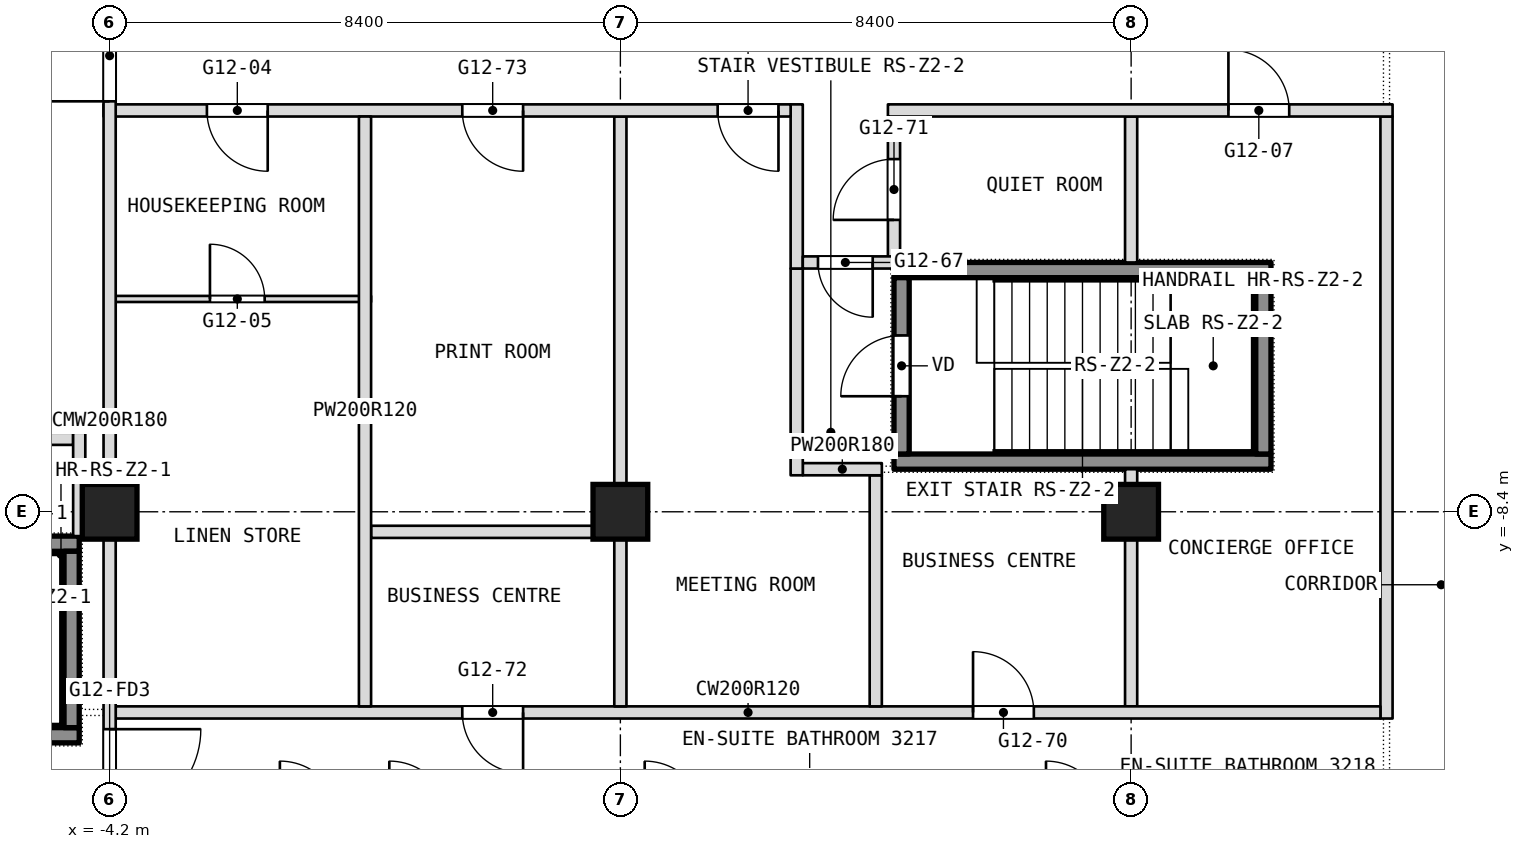
"""IFC4 building model, lengths in metres.
Left out: names, types, materials, properties, quantities, classifications, styles, units other than length and angle.
Written with IfcOpenShell. Run it as: python <this file> out.ifc"""

import sys

from ifc_helpers import new_model, si_unit, direction, frame, frame_2d, origin, origin_2d, place, context, subcontext, project, spatial, rectangle, extrude, element, fill, save


model = new_model("IFC4")
c1 = context("Model", 3, precision=1e-05, world=origin(), true_north=direction((0.0, 1.0)))
c2 = subcontext(c1, "Body", "Model", "MODEL_VIEW")
j1 = project(units=[si_unit("LENGTHUNIT", "METRE"), si_unit("PLANEANGLEUNIT", "RADIAN")], contexts=[c1])
p1 = place(None, origin())
s1 = spatial("IfcSite", under=j1, at=p1, CompositionType="ELEMENT")
p2 = place(p1, origin())
s2 = spatial("IfcBuilding", under=s1, at=p2, CompositionType="ELEMENT")
p3 = place(p2, frame((0.0, 0.0, 140.9)))
s3 = spatial("IfcBuildingStorey", under=s2, at=p3, CompositionType="ELEMENT", Elevation=140.9)
for number, where, z_axis, x_axis in (
    (1, (-4.2, -8.4, 0.0), (0.0, 0.0, 1.0), (1.0, 0.0, 0.0)),
    (2, (4.2, -8.4, 0.0), (0.0, 0.0, 1.0), (1.0, 0.0, 0.0)),
    (3, (12.6, -8.4, 0.0), (0.0, 0.0, 1.0), (1.0, 0.0, 0.0)),
):
    element("IfcColumn", number, at=place(p3, frame(where, z_axis=z_axis, x_axis=x_axis)), inside=s3, PredefinedType="COLUMN", context=c2, shape_type="SweptSolid", body=[
        extrude(rectangle(XDim=0.9, YDim=0.9, at=origin_2d()), origin(), (0.0, 0.0, 1.0), 3.6),
    ])
p4 = place(p3, frame((16.8, -11.8, 0.0), z_axis=(0.0, 0.0, 1.0), x_axis=(0.0, 1.0, 0.0)))
e4 = element("IfcWall", 4, at=p4, inside=s3, PredefinedType="PARTITIONING", context=c2, shape_type="SweptSolid", body=[
    extrude(rectangle(XDim=9.9, YDim=0.2, at=frame_2d((4.95, 0.0))), origin(), (0.0, 0.0, 1.0), 3.34),
])
p5 = place(p3, frame((12.6, -11.6, 0.0), z_axis=(0.0, 0.0, 1.0), x_axis=(0.0, 1.0, 0.0)))
e5 = element("IfcWall", 5, at=p5, inside=s3, PredefinedType="PARTITIONING", context=c2, shape_type="SweptSolid", body=[
    extrude(rectangle(XDim=3.9, YDim=0.2, at=frame_2d((1.95, 0.0))), origin(), (0.0, 0.0, 1.0), 3.34),
])
p6 = place(p3, frame((12.6, -4.3, 0.0), z_axis=(0.0, 0.0, 1.0), x_axis=(0.0, 1.0, 0.0)))
e6 = element("IfcWall", 6, at=p6, inside=s3, PredefinedType="PARTITIONING", context=c2, shape_type="SweptSolid", body=[
    extrude(rectangle(XDim=2.4, YDim=0.2, at=frame_2d((1.2, 0.0))), origin(), (0.0, 0.0, 1.0), 3.34),
])
p7 = place(p3, frame((-4.1, -11.7, 0.0), z_axis=(0.0, 0.0, 1.0), x_axis=(1.0, 0.0, 0.0)))
e7 = element("IfcWall", 7, at=p7, inside=s3, PredefinedType="PARTITIONING", context=c2, shape_type="SweptSolid", body=[
    extrude(rectangle(XDim=20.8, YDim=0.2, at=frame_2d((10.4, 0.0))), origin(), (0.0, 0.0, 1.0), 3.34),
])
p8 = place(p7, frame((14.1, 0.0, 0.0)))
e8 = element("IfcOpeningElement", 8, at=p8, cuts=e7, PredefinedType="OPENING", context=c2, shape_type="SweptSolid", body=[
    extrude(rectangle(XDim=1.0, YDim=2.1, at=frame_2d((0.5, 1.05))), frame((0.0, 0.1, 0.0), z_axis=(0.0, -1.0, 0.0), x_axis=(1.0, 0.0, 0.0)), (0.0, 0.0, 1.0), 0.2),
])
p9 = place(p7, frame((5.7, 0.0, 0.0)))
e9 = element("IfcOpeningElement", 9, at=p9, cuts=e7, PredefinedType="OPENING", context=c2, shape_type="SweptSolid", body=[
    extrude(rectangle(XDim=1.0, YDim=2.1, at=frame_2d((0.5, 1.05))), frame((0.0, 0.1, 0.0), z_axis=(0.0, -1.0, 0.0), x_axis=(1.0, 0.0, 0.0)), (0.0, 0.0, 1.0), 0.2),
])
p10 = place(p3, frame((0.1, -8.73, 0.0), z_axis=(0.0, 0.0, 1.0), x_axis=(1.0, 0.0, 0.0)))
e10 = element("IfcWall", 10, at=p10, inside=s3, PredefinedType="PARTITIONING", context=c2, shape_type="SweptSolid", body=[
    extrude(rectangle(XDim=4.0, YDim=0.2, at=frame_2d((2.0, 0.0))), origin(), (0.0, 0.0, 1.0), 3.34),
])
p11 = place(p3, frame((8.7, -4.3, 0.0), z_axis=(0.0, 0.0, 1.0), x_axis=(0.0, 1.0, 0.0)))
e11 = element("IfcWall", 11, at=p11, inside=s3, PredefinedType="PARTITIONING", context=c2, shape_type="SweptSolid", body=[
    extrude(rectangle(XDim=2.4, YDim=0.2, at=frame_2d((1.2, 0.0))), origin(), (0.0, 0.0, 1.0), 3.34),
])
p12 = place(p11, frame((0.7, 0.0, 0.0)))
e12 = element("IfcOpeningElement", 12, at=p12, cuts=e11, PredefinedType="OPENING", context=c2, shape_type="SweptSolid", body=[
    extrude(rectangle(XDim=1.0, YDim=2.1, at=frame_2d((0.5, 1.05))), frame((0.0, 0.1, 0.0), z_axis=(0.0, -1.0, 0.0), x_axis=(1.0, 0.0, 0.0)), (0.0, 0.0, 1.0), 0.2),
])
p13 = place(p3, frame((8.4, -11.6, 0.0), z_axis=(0.0, 0.0, 1.0), x_axis=(0.0, 1.0, 0.0)))
e13 = element("IfcWall", 13, at=p13, inside=s3, PredefinedType="PARTITIONING", context=c2, shape_type="SweptSolid", body=[
    extrude(rectangle(XDim=3.8, YDim=0.2, at=frame_2d((1.9, 0.0))), origin(), (0.0, 0.0, 1.0), 3.34),
])
p14 = place(p3, frame((7.2, -7.7, 0.0), z_axis=(0.0, 0.0, 1.0), x_axis=(1.0, 0.0, 0.0)))
e14 = element("IfcWall", 14, at=p14, inside=s3, PredefinedType="PARTITIONING", context=c2, shape_type="SweptSolid", body=[
    extrude(rectangle(XDim=1.3, YDim=0.2, at=frame_2d((0.65, 0.0))), origin(), (0.0, 0.0, 1.0), 3.34),
])
p15 = place(p3, frame((-8.5, -7.2, 0.0), z_axis=(0.0, 0.0, 1.0), x_axis=(1.0, 0.0, 0.0)))
e15 = element("IfcWall", 15, at=p15, inside=s3, PredefinedType="PARTITIONING", context=c2, shape_type="SweptSolid", body=[
    extrude(rectangle(XDim=3.7, YDim=0.2, at=frame_2d((1.85, 0.0))), origin(), (0.0, 0.0, 1.0), 3.34),
])
p16 = place(p15, frame((0.25, 0.0, 0.0)))
e16 = element("IfcOpeningElement", 16, at=p16, cuts=e15, PredefinedType="OPENING", context=c2, shape_type="SweptSolid", body=[
    extrude(rectangle(XDim=0.9, YDim=2.1, at=frame_2d((0.45, 1.05))), frame((0.0, 0.1, 0.0), z_axis=(0.0, -1.0, 0.0), x_axis=(1.0, 0.0, 0.0)), (0.0, 0.0, 1.0), 0.2),
])
p17 = place(p3, frame((7.1, -7.8, 0.0), z_axis=(0.0, 0.0, 1.0), x_axis=(0.0, 1.0, 0.0)))
e17 = element("IfcWall", 17, at=p17, inside=s3, PredefinedType="PARTITIONING", context=c2, shape_type="SweptSolid", body=[
    extrude(rectangle(XDim=3.4, YDim=0.2, at=frame_2d((1.7, 0.0))), origin(), (0.0, 0.0, 1.0), 3.34),
])
p18 = place(p3, frame((7.1, -4.4, 0.0), z_axis=(0.0, 0.0, 1.0), x_axis=(0.0, 1.0, 0.0)))
e18 = element("IfcWall", 18, at=p18, inside=s3, PredefinedType="PARTITIONING", context=c2, shape_type="SweptSolid", body=[
    extrude(rectangle(XDim=2.7, YDim=0.2, at=frame_2d((1.35, 0.0))), origin(), (0.0, 0.0, 1.0), 3.34),
])
p19 = place(p3, frame((-4.1, -4.9, 0.0), z_axis=(0.0, 0.0, 1.0), x_axis=(1.0, 0.0, 0.0)))
e19 = element("IfcWall", 19, at=p19, inside=s3, PredefinedType="PARTITIONING", context=c2, shape_type="SweptSolid", body=[
    extrude(rectangle(XDim=4.2, YDim=0.1, at=frame_2d((2.1, 0.0))), origin(), (0.0, 0.0, 1.0), 3.34),
])
p20 = place(p19, frame((1.55, 0.0, 0.0)))
e20 = element("IfcOpeningElement", 20, at=p20, cuts=e19, PredefinedType="OPENING", context=c2, shape_type="SweptSolid", body=[
    extrude(rectangle(XDim=0.9, YDim=2.1, at=frame_2d((0.45, 1.05))), frame((0.0, 0.05, 0.0), z_axis=(0.0, -1.0, 0.0), x_axis=(1.0, 0.0, 0.0)), (0.0, 0.0, 1.0), 0.1),
])
p21 = place(p3, frame((7.2, -4.3, 0.0), z_axis=(0.0, 0.0, 1.0), x_axis=(1.0, 0.0, 0.0)))
e21 = element("IfcWall", 21, at=p21, inside=s3, PredefinedType="PARTITIONING", context=c2, shape_type="SweptSolid", body=[
    extrude(rectangle(XDim=1.5, YDim=0.2, at=frame_2d((0.75, 0.0))), origin(), (0.0, 0.0, 1.0), 3.34),
])
p22 = place(p21, frame((0.25, 0.0, 0.0)))
e22 = element("IfcOpeningElement", 22, at=p22, cuts=e21, PredefinedType="OPENING", context=c2, shape_type="SweptSolid", body=[
    extrude(rectangle(XDim=0.9, YDim=2.1, at=frame_2d((0.45, 1.05))), frame((0.0, 0.1, 0.0), z_axis=(0.0, -1.0, 0.0), x_axis=(1.0, 0.0, 0.0)), (0.0, 0.0, 1.0), 0.2),
])
p23 = place(p3, frame((4.2, -11.6, 0.0), z_axis=(0.0, 0.0, 1.0), x_axis=(0.0, 1.0, 0.0)))
e23 = element("IfcWall", 23, at=p23, inside=s3, PredefinedType="PARTITIONING", context=c2, shape_type="SweptSolid", body=[
    extrude(rectangle(XDim=9.7, YDim=0.2, at=frame_2d((4.85, 0.0))), origin(), (0.0, 0.0, 1.0), 3.34),
])
p24 = place(p3, frame((-4.3, -1.8, 0.0), z_axis=(0.0, 0.0, 1.0), x_axis=(1.0, 0.0, 0.0)))
e24 = element("IfcWall", 24, at=p24, inside=s3, PredefinedType="PARTITIONING", context=c2, shape_type="SweptSolid", body=[
    extrude(rectangle(XDim=11.3, YDim=0.2, at=frame_2d((5.65, 0.0))), origin(), (0.0, 0.0, 1.0), 3.34),
])
p25 = place(p24, frame((1.7, 0.0, 0.0)))
e25 = element("IfcOpeningElement", 25, at=p25, cuts=e24, PredefinedType="OPENING", context=c2, shape_type="SweptSolid", body=[
    extrude(rectangle(XDim=1.0, YDim=2.1, at=frame_2d((0.5, 1.05))), frame((0.0, 0.1, 0.0), z_axis=(0.0, -1.0, 0.0), x_axis=(1.0, 0.0, 0.0)), (0.0, 0.0, 1.0), 0.2),
])
p26 = place(p24, frame((10.1, 0.0, 0.0)))
e26 = element("IfcOpeningElement", 26, at=p26, cuts=e24, PredefinedType="OPENING", context=c2, shape_type="SweptSolid", body=[
    extrude(rectangle(XDim=1.0, YDim=2.1, at=frame_2d((0.5, 1.05))), frame((0.0, 0.1, 0.0), z_axis=(0.0, -1.0, 0.0), x_axis=(1.0, 0.0, 0.0)), (0.0, 0.0, 1.0), 0.2),
])
p27 = place(p24, frame((5.9, 0.0, 0.0)))
e27 = element("IfcOpeningElement", 27, at=p27, cuts=e24, PredefinedType="OPENING", context=c2, shape_type="SweptSolid", body=[
    extrude(rectangle(XDim=1.0, YDim=2.1, at=frame_2d((0.5, 1.05))), frame((0.0, 0.1, 0.0), z_axis=(0.0, -1.0, 0.0), x_axis=(1.0, 0.0, 0.0)), (0.0, 0.0, 1.0), 0.2),
])
p28 = place(p3, frame((8.6, -1.8, 0.0), z_axis=(0.0, 0.0, 1.0), x_axis=(1.0, 0.0, 0.0)))
e28 = element("IfcWall", 28, at=p28, inside=s3, PredefinedType="PARTITIONING", context=c2, shape_type="SweptSolid", body=[
    extrude(rectangle(XDim=8.3, YDim=0.2, at=frame_2d((4.15, 0.0))), origin(), (0.0, 0.0, 1.0), 3.34),
])
p29 = place(p28, frame((5.6, 0.0, 0.0)))
e29 = element("IfcOpeningElement", 29, at=p29, cuts=e28, PredefinedType="OPENING", context=c2, shape_type="SweptSolid", body=[
    extrude(rectangle(XDim=1.0, YDim=2.1, at=frame_2d((0.5, 1.05))), frame((0.0, 0.1, 0.0), z_axis=(0.0, -1.0, 0.0), x_axis=(1.0, 0.0, 0.0)), (0.0, 0.0, 1.0), 0.2),
])
p30 = place(p3, frame((0.0, -11.6, 0.0), z_axis=(0.0, 0.0, 1.0), x_axis=(0.0, 1.0, 0.0)))
e30 = element("IfcWall", 30, at=p30, inside=s3, PredefinedType="PARTITIONING", context=c2, shape_type="SweptSolid", body=[
    extrude(rectangle(XDim=9.7, YDim=0.2, at=frame_2d((4.85, 0.0))), origin(), (0.0, 0.0, 1.0), 3.34),
])
p31 = place(p3, frame((-4.2, -13.8, 0.0), z_axis=(0.0, 0.0, 1.0), x_axis=(0.0, 1.0, 0.0)))
e31 = element("IfcWall", 31, at=p31, inside=s3, PredefinedType="PARTITIONING", context=c2, shape_type="SweptSolid", body=[
    extrude(rectangle(XDim=13.8, YDim=0.2, at=frame_2d((6.9, 0.0))), origin(), (0.0, 0.0, 1.0), 3.34),
])
p32 = place(p31, frame((12.15, 0.0, 0.0)))
e32 = element("IfcOpeningElement", 32, at=p32, cuts=e31, PredefinedType="OPENING", context=c2, shape_type="SweptSolid", body=[
    extrude(rectangle(XDim=1.5, YDim=2.1, at=frame_2d((0.75, 1.05))), frame((0.0, 0.1, 0.0), z_axis=(0.0, -1.0, 0.0), x_axis=(1.0, 0.0, 0.0)), (0.0, 0.0, 1.0), 0.2),
])
p33 = place(p31, frame((0.325, 0.0, 0.0)))
e33 = element("IfcOpeningElement", 33, at=p33, cuts=e31, PredefinedType="OPENING", context=c2, shape_type="SweptSolid", body=[
    extrude(rectangle(XDim=1.5, YDim=2.1, at=frame_2d((0.75, 1.05))), frame((0.0, 0.1, 0.0), z_axis=(0.0, -1.0, 0.0), x_axis=(1.0, 0.0, 0.0)), (0.0, 0.0, 1.0), 0.2),
])
p34 = place(p3, frame((-4.7, -8.8, 0.0), z_axis=(0.0, 0.0, 1.0), x_axis=(0.0, 1.0, 0.0)))
e34 = element("IfcWall", 34, at=p34, inside=s3, PredefinedType="PARTITIONING", context=c2, shape_type="SweptSolid", body=[
    extrude(rectangle(XDim=1.7, YDim=0.2, at=frame_2d((0.85, 0.0))), origin(), (0.0, 0.0, 1.0), 3.34),
])
p35 = place(p3, frame((-10.9, -12.075, 0.1), z_axis=(0.0, 0.0, 1.0), x_axis=(1.0, 0.0, 0.0)))
e35 = element("IfcWall", 35, at=p35, inside=s3, PredefinedType="SHEAR", context=c2, shape_type="SweptSolid", body=[
    extrude(rectangle(XDim=6.2, YDim=0.25, at=frame_2d((3.1, 0.0))), origin(), (0.0, 0.0, 1.0), 3.6),
])
p36 = place(p3, frame((-10.9, -8.925, 0.1), z_axis=(0.0, 0.0, 1.0), x_axis=(1.0, 0.0, 0.0)))
e36 = element("IfcWall", 36, at=p36, inside=s3, PredefinedType="SHEAR", context=c2, shape_type="SweptSolid", body=[
    extrude(rectangle(XDim=6.2, YDim=0.25, at=frame_2d((3.1, 0.0))), origin(), (0.0, 0.0, 1.0), 3.6),
])
p37 = place(p36, frame((0.45, 0.0, 0.0)))
e37 = element("IfcOpeningElement", 37, at=p37, cuts=e36, PredefinedType="OPENING", context=c2, shape_type="SweptSolid", body=[
    extrude(rectangle(XDim=1.0, YDim=2.1, at=frame_2d((0.5, 1.05))), frame((0.0, 0.125, 0.0), z_axis=(0.0, -1.0, 0.0), x_axis=(1.0, 0.0, 0.0)), (0.0, 0.0, 1.0), 0.25),
])
p38 = place(p3, frame((-4.825, -11.95, 0.1), z_axis=(0.0, 0.0, 1.0), x_axis=(0.0, 1.0, 0.0)))
e38 = element("IfcWall", 38, at=p38, inside=s3, PredefinedType="SHEAR", context=c2, shape_type="SweptSolid", body=[
    extrude(rectangle(XDim=2.9, YDim=0.25, at=frame_2d((1.45, 0.0))), origin(), (0.0, 0.0, 1.0), 3.6),
])
for number, where, z_axis, x_axis in (
    (39, (8.7, -7.575, 0.1), (0.0, 0.0, 1.0), (1.0, 0.0, 0.0)),
    (40, (8.7, -4.425, 0.1), (0.0, 0.0, 1.0), (1.0, 0.0, 0.0)),
):
    element("IfcWall", number, at=place(p3, frame(where, z_axis=z_axis, x_axis=x_axis)), inside=s3, PredefinedType="SHEAR", context=c2, shape_type="SweptSolid", body=[
        extrude(rectangle(XDim=6.2, YDim=0.25, at=frame_2d((3.1, 0.0))), origin(), (0.0, 0.0, 1.0), 3.6),
    ])
p39 = place(p3, frame((8.825, -7.45, 0.1), z_axis=(0.0, 0.0, 1.0), x_axis=(0.0, 1.0, 0.0)))
e41 = element("IfcWall", 41, at=p39, inside=s3, PredefinedType="SHEAR", context=c2, shape_type="SweptSolid", body=[
    extrude(rectangle(XDim=2.9, YDim=0.25, at=frame_2d((1.45, 0.0))), origin(), (0.0, 0.0, 1.0), 3.6),
])
p40 = place(p39, frame((0.95, 0.0, 0.0)))
e42 = element("IfcOpeningElement", 42, at=p40, cuts=e41, PredefinedType="OPENING", context=c2, shape_type="SweptSolid", body=[
    extrude(rectangle(XDim=1.0, YDim=2.1, at=frame_2d((0.5, 1.05))), frame((0.0, 0.125, 0.0), z_axis=(0.0, -1.0, 0.0), x_axis=(1.0, 0.0, 0.0)), (0.0, 0.0, 1.0), 0.25),
])
p41 = place(p3, frame((14.775, -7.45, 0.1), z_axis=(0.0, 0.0, 1.0), x_axis=(0.0, 1.0, 0.0)))
e43 = element("IfcWall", 43, at=p41, inside=s3, PredefinedType="SHEAR", context=c2, shape_type="SweptSolid", body=[
    extrude(rectangle(XDim=2.9, YDim=0.25, at=frame_2d((1.45, 0.0))), origin(), (0.0, 0.0, 1.0), 3.6),
])
p42 = place(p8, origin())
e44 = element("IfcDoor", 44, at=p42, inside=s3, OperationType="SINGLE_SWING_RIGHT", PredefinedType="DOOR", context=c2, shape_type="SweptSolid", body=[
    extrude(rectangle(XDim=1.0, YDim=2.1, at=frame_2d((0.5, 1.05))), frame((0.0, 0.025, 0.0), z_axis=(0.0, -1.0, 0.0), x_axis=(1.0, 0.0, 0.0)), (0.0, 0.0, 1.0), 0.05),
])
fill(e8, e44)
p43 = place(p9, origin())
e45 = element("IfcDoor", 45, at=p43, inside=s3, OperationType="SINGLE_SWING_RIGHT", PredefinedType="DOOR", context=c2, shape_type="SweptSolid", body=[
    extrude(rectangle(XDim=1.0, YDim=2.1, at=frame_2d((0.5, 1.05))), frame((0.0, 0.025, 0.0), z_axis=(0.0, -1.0, 0.0), x_axis=(1.0, 0.0, 0.0)), (0.0, 0.0, 1.0), 0.05),
])
fill(e9, e45)
p44 = place(p12, origin())
e46 = element("IfcDoor", 46, at=p44, inside=s3, OperationType="SINGLE_SWING_LEFT", PredefinedType="DOOR", context=c2, shape_type="SweptSolid", body=[
    extrude(rectangle(XDim=1.0, YDim=2.1, at=frame_2d((0.5, 1.05))), frame((0.0, 0.025, 0.0), z_axis=(0.0, -1.0, 0.0), x_axis=(1.0, 0.0, 0.0)), (0.0, 0.0, 1.0), 0.05),
])
fill(e12, e46)
p45 = place(p20, origin())
e47 = element("IfcDoor", 47, at=p45, inside=s3, OperationType="SINGLE_SWING_LEFT", PredefinedType="DOOR", context=c2, shape_type="SweptSolid", body=[
    extrude(rectangle(XDim=0.9, YDim=2.1, at=frame_2d((0.45, 1.05))), frame((0.0, 0.025, 0.0), z_axis=(0.0, -1.0, 0.0), x_axis=(1.0, 0.0, 0.0)), (0.0, 0.0, 1.0), 0.05),
])
fill(e20, e47)
p46 = place(p22, origin())
e48 = element("IfcDoor", 48, at=p46, inside=s3, OperationType="SINGLE_SWING_LEFT", PredefinedType="DOOR", context=c2, shape_type="SweptSolid", body=[
    extrude(rectangle(XDim=0.9, YDim=2.1, at=frame_2d((0.45, 1.05))), frame((0.0, 0.025, 0.0), z_axis=(0.0, -1.0, 0.0), x_axis=(1.0, 0.0, 0.0)), (0.0, 0.0, 1.0), 0.05),
])
fill(e22, e48)
p47 = place(p25, origin())
e49 = element("IfcDoor", 49, at=p47, inside=s3, OperationType="SINGLE_SWING_RIGHT", PredefinedType="DOOR", context=c2, shape_type="SweptSolid", body=[
    extrude(rectangle(XDim=1.0, YDim=2.1, at=frame_2d((0.5, 1.05))), frame((0.0, 0.025, 0.0), z_axis=(0.0, -1.0, 0.0), x_axis=(1.0, 0.0, 0.0)), (0.0, 0.0, 1.0), 0.05),
])
fill(e25, e49)
p48 = place(p26, origin())
e50 = element("IfcDoor", 50, at=p48, inside=s3, OperationType="SINGLE_SWING_LEFT", PredefinedType="DOOR", context=c2, shape_type="SweptSolid", body=[
    extrude(rectangle(XDim=1.0, YDim=2.1, at=frame_2d((0.5, 1.05))), frame((0.0, 0.025, 0.0), z_axis=(0.0, -1.0, 0.0), x_axis=(1.0, 0.0, 0.0)), (0.0, 0.0, 1.0), 0.05),
])
fill(e26, e50)
p49 = place(p27, origin())
e51 = element("IfcDoor", 51, at=p49, inside=s3, OperationType="SINGLE_SWING_LEFT", PredefinedType="DOOR", context=c2, shape_type="SweptSolid", body=[
    extrude(rectangle(XDim=1.0, YDim=2.1, at=frame_2d((0.5, 1.05))), frame((0.0, 0.025, 0.0), z_axis=(0.0, -1.0, 0.0), x_axis=(1.0, 0.0, 0.0)), (0.0, 0.0, 1.0), 0.05),
])
fill(e27, e51)
p50 = place(p29, origin())
e52 = element("IfcDoor", 52, at=p50, inside=s3, OperationType="SINGLE_SWING_LEFT", PredefinedType="DOOR", context=c2, shape_type="SweptSolid", body=[
    extrude(rectangle(XDim=1.0, YDim=2.1, at=frame_2d((0.5, 1.05))), frame((0.0, 0.025, 0.0), z_axis=(0.0, -1.0, 0.0), x_axis=(1.0, 0.0, 0.0)), (0.0, 0.0, 1.0), 0.05),
])
fill(e29, e52)
p51 = place(p40, origin())
e53 = element("IfcDoor", 53, at=p51, inside=s3, OperationType="SINGLE_SWING_LEFT", PredefinedType="DOOR", context=c2, shape_type="SweptSolid", body=[
    extrude(rectangle(XDim=1.0, YDim=2.1, at=frame_2d((0.5, 1.05))), frame((0.0, 0.025, 0.0), z_axis=(0.0, -1.0, 0.0), x_axis=(1.0, 0.0, 0.0)), (0.0, 0.0, 1.0), 0.05),
])
fill(e42, e53)
p52 = place(p32, origin())
e54 = element("IfcDoor", 54, at=p52, inside=s3, OperationType="DOUBLE_DOOR_DOUBLE_SWING", PredefinedType="DOOR", context=c2, shape_type="SweptSolid", body=[
    extrude(rectangle(XDim=1.5, YDim=2.1, at=frame_2d((0.75, 1.05))), frame((0.0, 0.025, 0.0), z_axis=(0.0, -1.0, 0.0), x_axis=(1.0, 0.0, 0.0)), (0.0, 0.0, 1.0), 0.05),
])
fill(e32, e54)
p53 = place(p33, origin())
e55 = element("IfcDoor", 55, at=p53, inside=s3, OperationType="DOUBLE_DOOR_DOUBLE_SWING", PredefinedType="DOOR", context=c2, shape_type="SweptSolid", body=[
    extrude(rectangle(XDim=1.5, YDim=2.1, at=frame_2d((0.75, 1.05))), frame((0.0, 0.025, 0.0), z_axis=(0.0, -1.0, 0.0), x_axis=(1.0, 0.0, 0.0)), (0.0, 0.0, 1.0), 0.05),
])
fill(e33, e55)
save(model, sys.argv[1])
